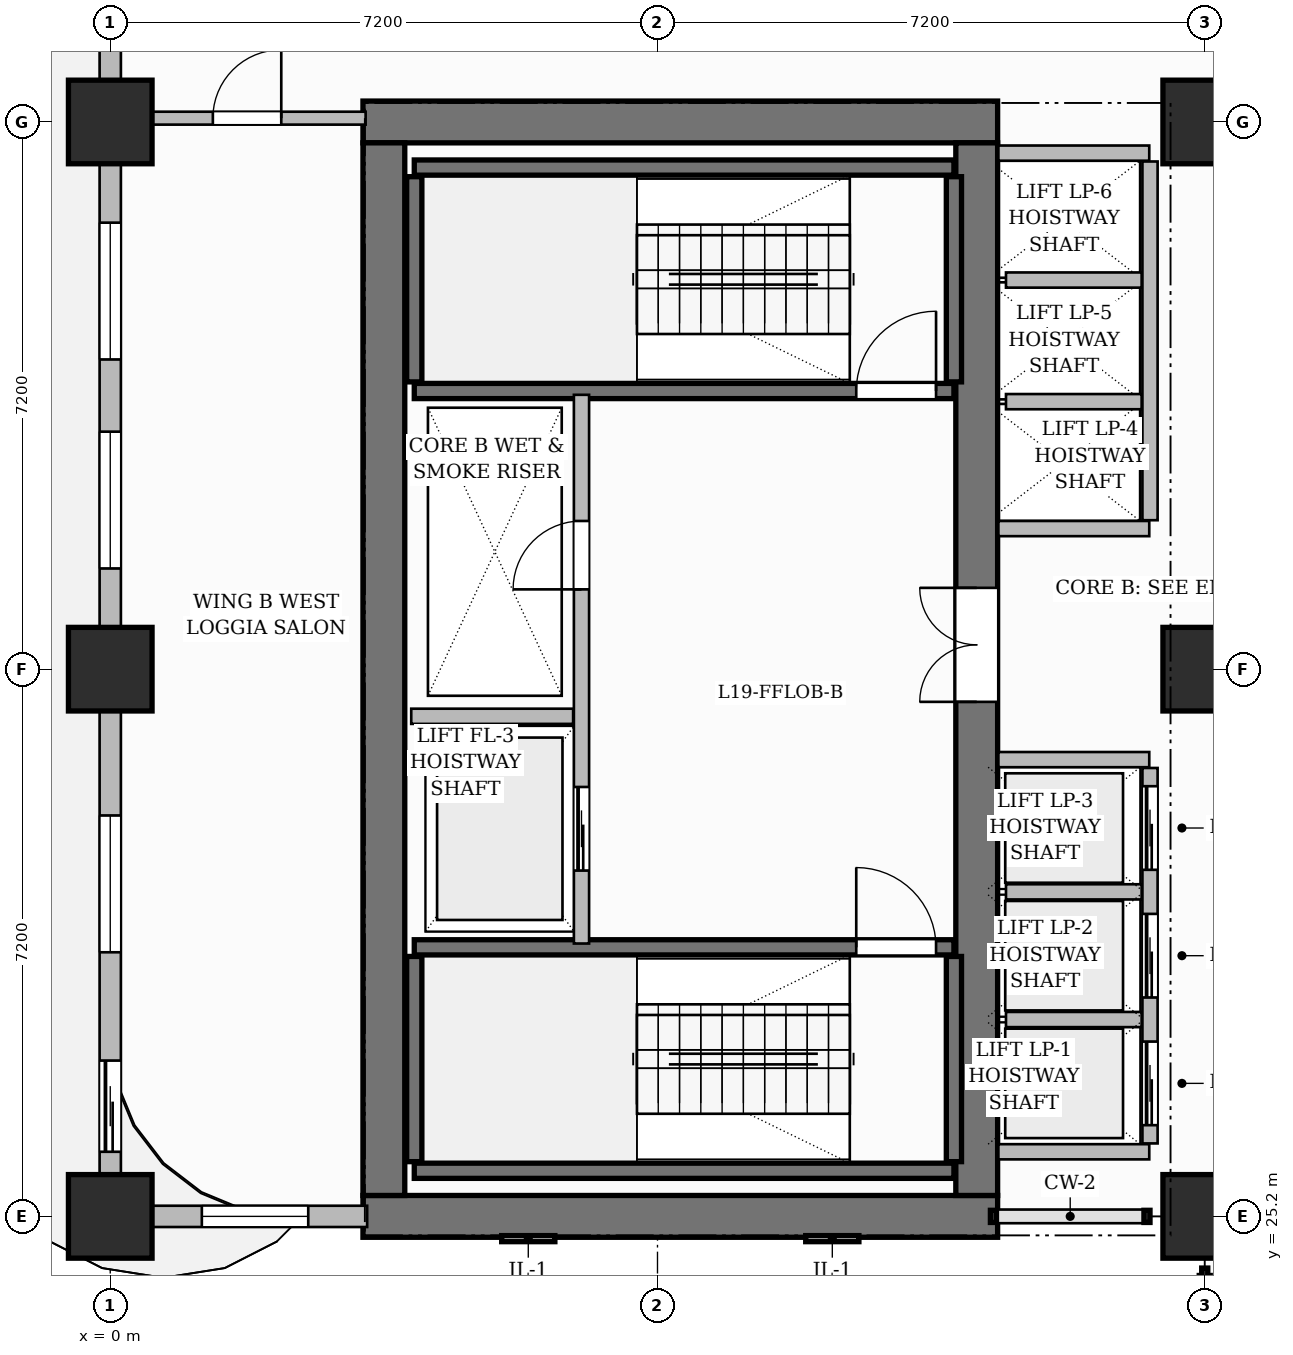
"""IFC4 building model, lengths in metres.
Left out: names, types, materials, properties, quantities, classifications, styles, units other than length and angle.
Written with IfcOpenShell. Run it as: python <this file> out.ifc"""

import sys

from ifc_helpers import new_model, si_unit, direction, frame, frame_2d, origin, origin_2d, place, context, subcontext, project, spatial, rectangle, extrude, source, transform, mapped, element, fill, save


model = new_model("IFC4")
c1 = context("Model", 3, precision=1e-05, world=origin(), true_north=direction((0.0, 1.0)))
c2 = subcontext(c1, "Body", "Model", "MODEL_VIEW")
j1 = project(units=[si_unit("LENGTHUNIT", "METRE"), si_unit("PLANEANGLEUNIT", "RADIAN")], contexts=[c1])
p1 = place(None, origin())
s1 = spatial("IfcSite", under=j1, at=p1, CompositionType="ELEMENT")
p2 = place(p1, origin())
s2 = spatial("IfcBuilding", under=s1, at=p2, CompositionType="ELEMENT")
p3 = place(p2, frame((0.0, 0.0, 80.5)))
s3 = spatial("IfcBuildingStorey", under=s2, at=p3, CompositionType="ELEMENT", Elevation=80.5)
for number, where, z_axis, x_axis in (
    (1, (3.325, 25.2, 0.0), (0.0, 0.0, 1.0), (1.0, 0.0, 0.0)),
    (2, (3.325, 39.6, 0.0), (0.0, 0.0, 1.0), (1.0, 0.0, 0.0)),
):
    element("IfcWall", number, at=place(p3, frame(where, z_axis=z_axis, x_axis=x_axis)), inside=s3, PredefinedType="SHEAR", context=c2, shape_type="SweptSolid", body=[
        extrude(rectangle(XDim=8.35, YDim=0.55, at=frame_2d((4.175, 0.0))), origin(), (0.0, 0.0, 1.0), 3.7),
    ])
p4 = place(p3, frame((3.6, 25.475, 0.0), z_axis=(0.0, 0.0, 1.0), x_axis=(0.0, 1.0, 0.0)))
e3 = element("IfcWall", 3, at=p4, inside=s3, PredefinedType="SHEAR", context=c2, shape_type="SweptSolid", body=[
    extrude(rectangle(XDim=13.85, YDim=0.55, at=frame_2d((6.925, 0.0))), origin(), (0.0, 0.0, 1.0), 3.7),
])
p5 = place(p3, frame((11.4, 25.475, 0.0), z_axis=(0.0, 0.0, 1.0), x_axis=(0.0, 1.0, 0.0)))
e4 = element("IfcWall", 4, at=p5, inside=s3, PredefinedType="SHEAR", context=c2, shape_type="SweptSolid", body=[
    extrude(rectangle(XDim=13.85, YDim=0.55, at=frame_2d((6.925, 0.0))), origin(), (0.0, 0.0, 1.0), 3.7),
])
p6 = place(p5, frame((6.495, 0.0, 0.0)))
e5 = element("IfcOpeningElement", 5, at=p6, cuts=e4, PredefinedType="OPENING", context=c2, shape_type="SweptSolid", body=[
    extrude(rectangle(XDim=1.5, YDim=2.2, at=frame_2d((0.75, 1.1))), frame((0.0, 0.285, 0.0), z_axis=(0.0, -1.0, 0.0), x_axis=(1.0, 0.0, 0.0)), (0.0, 0.0, 1.0), 0.57),
])
m1 = source(origin(), c2, "Body", "SweptSolid", [
    extrude(rectangle(XDim=1.1, YDim=1.1, at=origin_2d()), origin(), (0.0, 0.0, 1.0), 3.7),
])
for number, where, z_axis, x_axis in (
    (6, (0.0, 25.2, 0.0), (0.0, 0.0, 1.0), (1.0, 0.0, 0.0)),
    (7, (0.0, 32.4, 0.0), (0.0, 0.0, 1.0), (1.0, 0.0, 0.0)),
    (8, (0.0, 39.6, 0.0), (0.0, 0.0, 1.0), (1.0, 0.0, 0.0)),
    (9, (14.4, 25.2, 0.0), (0.0, 0.0, 1.0), (1.0, 0.0, 0.0)),
    (10, (14.4, 32.4, 0.0), (0.0, 0.0, 1.0), (1.0, 0.0, 0.0)),
    (11, (14.4, 39.6, 0.0), (0.0, 0.0, 1.0), (1.0, 0.0, 0.0)),
):
    element("IfcColumn", number, at=place(p3, frame(where, z_axis=z_axis, x_axis=x_axis)), inside=s3, PredefinedType="COLUMN", context=c2, shape_type="MappedRepresentation", body=[
        mapped(m1, transform((0.0, 0.0, 0.0), scale=1.0)),
    ])
p7 = place(p3, frame((4.0, 25.8, 0.0), z_axis=(0.0, 0.0, 1.0), x_axis=(1.0, 0.0, 0.0)))
e12 = element("IfcWall", 12, at=p7, inside=s3, PredefinedType="SHEAR", context=c2, shape_type="SweptSolid", body=[
    extrude(rectangle(XDim=7.1, YDim=0.2, at=frame_2d((3.55, 0.0))), origin(), (0.0, 0.0, 1.0), 3.7),
])
for number, where, z_axis, x_axis in (
    (13, (4.0, 25.92, 0.0), (0.0, 0.0, 1.0), (0.0, 1.0, 0.0)),
    (14, (11.1, 25.92, 0.0), (0.0, 0.0, 1.0), (0.0, 1.0, 0.0)),
):
    element("IfcWall", number, at=place(p3, frame(where, z_axis=z_axis, x_axis=x_axis)), inside=s3, PredefinedType="SHEAR", context=c2, shape_type="SweptSolid", body=[
        extrude(rectangle(XDim=2.7, YDim=0.2, at=frame_2d((1.35, 0.0))), origin(), (0.0, 0.0, 1.0), 3.7),
    ])
p8 = place(p3, frame((4.0, 28.74, 0.0), z_axis=(0.0, 0.0, 1.0), x_axis=(1.0, 0.0, 0.0)))
e15 = element("IfcWall", 15, at=p8, inside=s3, PredefinedType="SHEAR", context=c2, shape_type="SweptSolid", body=[
    extrude(rectangle(XDim=7.1, YDim=0.2, at=frame_2d((3.55, 0.0))), origin(), (0.0, 0.0, 1.0), 3.7),
])
p9 = place(p8, frame((5.815, 0.0, 0.0)))
e16 = element("IfcOpeningElement", 16, at=p9, cuts=e15, PredefinedType="OPENING", context=c2, shape_type="SweptSolid", body=[
    extrude(rectangle(XDim=1.05, YDim=2.2, at=frame_2d((0.525, 1.1))), frame((0.0, 0.11, 0.0), z_axis=(0.0, -1.0, 0.0), x_axis=(1.0, 0.0, 0.0)), (0.0, 0.0, 1.0), 0.22),
])
p10 = place(p3, frame((4.0, 39.0, 0.0), z_axis=(0.0, 0.0, 1.0), x_axis=(1.0, 0.0, 0.0)))
e17 = element("IfcWall", 17, at=p10, inside=s3, PredefinedType="SHEAR", context=c2, shape_type="SweptSolid", body=[
    extrude(rectangle(XDim=7.1, YDim=0.2, at=frame_2d((3.55, 0.0))), origin(), (0.0, 0.0, 1.0), 3.7),
])
for number, where, z_axis, x_axis in (
    (18, (4.0, 36.18, 0.0), (0.0, 0.0, 1.0), (0.0, 1.0, 0.0)),
    (19, (11.1, 36.18, 0.0), (0.0, 0.0, 1.0), (0.0, 1.0, 0.0)),
):
    element("IfcWall", number, at=place(p3, frame(where, z_axis=z_axis, x_axis=x_axis)), inside=s3, PredefinedType="SHEAR", context=c2, shape_type="SweptSolid", body=[
        extrude(rectangle(XDim=2.7, YDim=0.2, at=frame_2d((1.35, 0.0))), origin(), (0.0, 0.0, 1.0), 3.7),
    ])
p11 = place(p3, frame((4.0, 36.06, 0.0), z_axis=(0.0, 0.0, 1.0), x_axis=(1.0, 0.0, 0.0)))
e20 = element("IfcWall", 20, at=p11, inside=s3, PredefinedType="SHEAR", context=c2, shape_type="SweptSolid", body=[
    extrude(rectangle(XDim=7.1, YDim=0.2, at=frame_2d((3.55, 0.0))), origin(), (0.0, 0.0, 1.0), 3.7),
])
p12 = place(p11, frame((5.815, 0.0, 0.0)))
e21 = element("IfcOpeningElement", 21, at=p12, cuts=e20, PredefinedType="OPENING", context=c2, shape_type="SweptSolid", body=[
    extrude(rectangle(XDim=1.05, YDim=2.2, at=frame_2d((0.525, 1.1))), frame((0.0, 0.11, 0.0), z_axis=(0.0, -1.0, 0.0), x_axis=(1.0, 0.0, 0.0)), (0.0, 0.0, 1.0), 0.22),
])
p13 = place(p3, frame((6.2, 28.79, 0.0), z_axis=(0.0, 0.0, 1.0), x_axis=(0.0, 1.0, 0.0)))
e22 = element("IfcWall", 22, at=p13, inside=s3, PredefinedType="PARTITIONING", context=c2, shape_type="SweptSolid", body=[
    extrude(rectangle(XDim=7.22, YDim=0.2, at=frame_2d((3.61, 0.0))), origin(), (0.0, 0.0, 1.0), 3.45),
])
p14 = place(p13, frame((4.66, 0.0, 0.0)))
e23 = element("IfcOpeningElement", 23, at=p14, cuts=e22, PredefinedType="OPENING", context=c2, shape_type="SweptSolid", body=[
    extrude(rectangle(XDim=0.9, YDim=2.1, at=frame_2d((0.45, 1.05))), frame((0.0, 0.11, 0.0), z_axis=(0.0, -1.0, 0.0), x_axis=(1.0, 0.0, 0.0)), (0.0, 0.0, 1.0), 0.22),
])
p15 = place(p13, frame((0.96, 0.0, 0.0)))
e24 = element("IfcOpeningElement", 24, at=p15, cuts=e22, PredefinedType="OPENING", context=c2, shape_type="SweptSolid", body=[
    extrude(rectangle(XDim=1.1, YDim=2.2, at=frame_2d((0.55, 1.1))), frame((0.0, 0.11, 0.0), z_axis=(0.0, -1.0, 0.0), x_axis=(1.0, 0.0, 0.0)), (0.0, 0.0, 1.0), 0.22),
])
p16 = place(p3, frame((3.96, 31.78, 0.0), z_axis=(0.0, 0.0, 1.0), x_axis=(1.0, 0.0, 0.0)))
e25 = element("IfcWall", 25, at=p16, inside=s3, PredefinedType="PARTITIONING", context=c2, shape_type="SweptSolid", body=[
    extrude(rectangle(XDim=2.13, YDim=0.2, at=frame_2d((1.065, 0.0))), origin(), (0.0, 0.0, 1.0), 3.45),
])
for number, where, z_axis, x_axis in (
    (26, (11.685, 26.05, 0.0), (0.0, 0.0, 1.0), (1.0, 0.0, 0.0)),
    (27, (11.685, 31.21, 0.0), (0.0, 0.0, 1.0), (1.0, 0.0, 0.0)),
):
    element("IfcWall", number, at=place(p3, frame(where, z_axis=z_axis, x_axis=x_axis)), inside=s3, PredefinedType="PARTITIONING", context=c2, shape_type="SweptSolid", body=[
        extrude(rectangle(XDim=1.985, YDim=0.2, at=frame_2d((0.992, 0.0))), origin(), (0.0, 0.0, 1.0), 3.45),
    ])
p17 = place(p3, frame((13.68, 26.16, 0.0), z_axis=(0.0, 0.0, 1.0), x_axis=(0.0, 1.0, 0.0)))
e28 = element("IfcWall", 28, at=p17, inside=s3, PredefinedType="PARTITIONING", context=c2, shape_type="SweptSolid", body=[
    extrude(rectangle(XDim=4.94, YDim=0.2, at=frame_2d((2.47, 0.0))), origin(), (0.0, 0.0, 1.0), 3.45),
])
p18 = place(p17, frame((0.24, 0.0, 0.0)))
e29 = element("IfcOpeningElement", 29, at=p18, cuts=e28, PredefinedType="OPENING", context=c2, shape_type="SweptSolid", body=[
    extrude(rectangle(XDim=1.1, YDim=2.2, at=frame_2d((0.55, 1.1))), frame((0.0, 0.11, 0.0), z_axis=(0.0, -1.0, 0.0), x_axis=(1.0, 0.0, 0.0)), (0.0, 0.0, 1.0), 0.22),
])
p19 = place(p17, frame((1.92, 0.0, 0.0)))
e30 = element("IfcOpeningElement", 30, at=p19, cuts=e28, PredefinedType="OPENING", context=c2, shape_type="SweptSolid", body=[
    extrude(rectangle(XDim=1.1, YDim=2.2, at=frame_2d((0.55, 1.1))), frame((0.0, 0.11, 0.0), z_axis=(0.0, -1.0, 0.0), x_axis=(1.0, 0.0, 0.0)), (0.0, 0.0, 1.0), 0.22),
])
p20 = place(p17, frame((3.6, 0.0, 0.0)))
e31 = element("IfcOpeningElement", 31, at=p20, cuts=e28, PredefinedType="OPENING", context=c2, shape_type="SweptSolid", body=[
    extrude(rectangle(XDim=1.1, YDim=2.2, at=frame_2d((0.55, 1.1))), frame((0.0, 0.11, 0.0), z_axis=(0.0, -1.0, 0.0), x_axis=(1.0, 0.0, 0.0)), (0.0, 0.0, 1.0), 0.22),
])
for number, where, z_axis, x_axis in (
    (32, (11.785, 27.79, 0.0), (0.0, 0.0, 1.0), (1.0, 0.0, 0.0)),
    (33, (11.785, 29.47, 0.0), (0.0, 0.0, 1.0), (1.0, 0.0, 0.0)),
):
    element("IfcWall", number, at=place(p3, frame(where, z_axis=z_axis, x_axis=x_axis)), inside=s3, PredefinedType="PARTITIONING", context=c2, shape_type="SweptSolid", body=[
        extrude(rectangle(XDim=1.785, YDim=0.2, at=frame_2d((0.893, 0.0))), origin(), (0.0, 0.0, 1.0), 3.45),
    ])
for number, where, z_axis, x_axis in (
    (34, (11.685, 34.25, 0.0), (0.0, 0.0, 1.0), (1.0, 0.0, 0.0)),
    (35, (11.685, 39.19, 0.0), (0.0, 0.0, 1.0), (1.0, 0.0, 0.0)),
):
    element("IfcWall", number, at=place(p3, frame(where, z_axis=z_axis, x_axis=x_axis)), inside=s3, PredefinedType="PARTITIONING", context=c2, shape_type="SweptSolid", body=[
        extrude(rectangle(XDim=1.985, YDim=0.2, at=frame_2d((0.992, 0.0))), origin(), (0.0, 0.0, 1.0), 3.45),
    ])
p21 = place(p3, frame((13.68, 34.36, 0.0), z_axis=(0.0, 0.0, 1.0), x_axis=(0.0, 1.0, 0.0)))
e36 = element("IfcWall", 36, at=p21, inside=s3, PredefinedType="PARTITIONING", context=c2, shape_type="SweptSolid", body=[
    extrude(rectangle(XDim=4.72, YDim=0.2, at=frame_2d((2.36, 0.0))), origin(), (0.0, 0.0, 1.0), 3.45),
])
for number, where, z_axis, x_axis in (
    (37, (11.785, 35.92, 0.0), (0.0, 0.0, 1.0), (1.0, 0.0, 0.0)),
    (38, (11.785, 37.52, 0.0), (0.0, 0.0, 1.0), (1.0, 0.0, 0.0)),
):
    element("IfcWall", number, at=place(p3, frame(where, z_axis=z_axis, x_axis=x_axis)), inside=s3, PredefinedType="PARTITIONING", context=c2, shape_type="SweptSolid", body=[
        extrude(rectangle(XDim=1.785, YDim=0.2, at=frame_2d((0.893, 0.0))), origin(), (0.0, 0.0, 1.0), 3.45),
    ])
p22 = place(p3, frame((0.24, 39.65, 0.0), z_axis=(0.0, 0.0, 1.0), x_axis=(1.0, 0.0, 0.0)))
e39 = element("IfcWall", 39, at=p22, inside=s3, PredefinedType="PARTITIONING", context=c2, shape_type="SweptSolid", body=[
    extrude(rectangle(XDim=3.12, YDim=0.17, at=frame_2d((1.56, 0.0))), origin(), (0.0, 0.0, 1.0), 3.45),
])
p23 = place(p22, frame((1.11, 0.0, 0.0)))
e40 = element("IfcOpeningElement", 40, at=p23, cuts=e39, PredefinedType="OPENING", context=c2, shape_type="SweptSolid", body=[
    extrude(rectangle(XDim=0.9, YDim=2.15, at=frame_2d((0.45, 1.075))), frame((0.0, 0.095, 0.0), z_axis=(0.0, -1.0, 0.0), x_axis=(1.0, 0.0, 0.0)), (0.0, 0.0, 1.0), 0.19),
])
p24 = place(p3, frame((0.0, 25.2, 0.0), z_axis=(0.0, 0.0, 1.0), x_axis=(1.0, 0.0, 0.0)))
e41 = element("IfcWall", 41, at=p24, inside=s3, PredefinedType="SOLIDWALL", context=c2, shape_type="SweptSolid", body=[
    extrude(rectangle(XDim=3.38, YDim=0.28, at=frame_2d((1.69, 0.0))), origin(), (0.0, 0.0, 1.0), 3.45),
])
p25 = place(p24, frame((1.205, 0.0, 0.8)))
e42 = element("IfcOpeningElement", 42, at=p25, cuts=e41, PredefinedType="OPENING", context=c2, shape_type="SweptSolid", body=[
    extrude(rectangle(XDim=1.4, YDim=1.85, at=frame_2d((0.7, 0.925))), frame((0.0, 0.15, 0.0), z_axis=(0.0, -1.0, 0.0), x_axis=(1.0, 0.0, 0.0)), (0.0, 0.0, 1.0), 0.3),
])
p26 = place(p3, frame((0.0, 25.25, 0.0), z_axis=(0.0, 0.0, 1.0), x_axis=(0.0, 1.0, 0.0)))
e43 = element("IfcWall", 43, at=p26, inside=s3, PredefinedType="SOLIDWALL", context=c2, shape_type="SweptSolid", body=[
    extrude(rectangle(XDim=21.5, YDim=0.28, at=frame_2d((10.75, 0.0))), origin(), (0.0, 0.0, 1.0), 2.885),
])
p27 = place(p26, frame((18.357, 0.0, 0.0)))
e44 = element("IfcOpeningElement", 44, at=p27, cuts=e43, PredefinedType="OPENING", context=c2, shape_type="SweptSolid", body=[
    extrude(rectangle(XDim=1.2, YDim=2.2, at=frame_2d((0.6, 1.1))), frame((0.0, 0.15, 0.0), z_axis=(0.0, -1.0, 0.0), x_axis=(1.0, 0.0, 0.0)), (0.0, 0.0, 1.0), 0.3),
])
p28 = place(p26, frame((0.8, 0.0, 0.0)))
e45 = element("IfcOpeningElement", 45, at=p28, cuts=e43, PredefinedType="OPENING", context=c2, shape_type="SweptSolid", body=[
    extrude(rectangle(XDim=1.2, YDim=2.2, at=frame_2d((0.6, 1.1))), frame((0.0, 0.15, 0.0), z_axis=(0.0, -1.0, 0.0), x_axis=(1.0, 0.0, 0.0)), (0.0, 0.0, 1.0), 0.3),
])
p29 = place(p26, frame((3.425, 0.0, 0.8)))
e46 = element("IfcOpeningElement", 46, at=p29, cuts=e43, PredefinedType="OPENING", context=c2, shape_type="SweptSolid", body=[
    extrude(rectangle(XDim=1.8, YDim=1.85, at=frame_2d((0.9, 0.925))), frame((0.0, 0.15, 0.0), z_axis=(0.0, -1.0, 0.0), x_axis=(1.0, 0.0, 0.0)), (0.0, 0.0, 1.0), 0.3),
])
p30 = place(p26, frame((8.475, 0.0, 0.8)))
e47 = element("IfcOpeningElement", 47, at=p30, cuts=e43, PredefinedType="OPENING", context=c2, shape_type="SweptSolid", body=[
    extrude(rectangle(XDim=1.8, YDim=1.85, at=frame_2d((0.9, 0.925))), frame((0.0, 0.15, 0.0), z_axis=(0.0, -1.0, 0.0), x_axis=(1.0, 0.0, 0.0)), (0.0, 0.0, 1.0), 0.3),
])
p31 = place(p26, frame((11.225, 0.0, 0.8)))
e48 = element("IfcOpeningElement", 48, at=p31, cuts=e43, PredefinedType="OPENING", context=c2, shape_type="SweptSolid", body=[
    extrude(rectangle(XDim=1.8, YDim=1.85, at=frame_2d((0.9, 0.925))), frame((0.0, 0.15, 0.0), z_axis=(0.0, -1.0, 0.0), x_axis=(1.0, 0.0, 0.0)), (0.0, 0.0, 1.0), 0.3),
])
p32 = place(p26, frame((16.632, 0.0, 0.8)))
e49 = element("IfcOpeningElement", 49, at=p32, cuts=e43, PredefinedType="OPENING", context=c2, shape_type="SweptSolid", body=[
    extrude(rectangle(XDim=1.15, YDim=1.8, at=frame_2d((0.575, 0.9))), frame((0.0, 0.15, 0.0), z_axis=(0.0, -1.0, 0.0), x_axis=(1.0, 0.0, 0.0)), (0.0, 0.0, 1.0), 0.3),
])
m2 = source(origin(), c2, "Body", "SweptSolid", [
    extrude(rectangle(XDim=1.05, YDim=2.2, at=frame_2d((0.525, 1.1))), frame((0.0, 0.025, 0.0), z_axis=(0.0, -1.0, 0.0), x_axis=(1.0, 0.0, 0.0)), (0.0, 0.0, 1.0), 0.05),
])
p33 = place(p9, origin())
e50 = element("IfcDoor", 50, at=p33, inside=s3, OperationType="SINGLE_SWING_LEFT", PredefinedType="DOOR", context=c2, shape_type="MappedRepresentation", body=[
    mapped(m2, transform((0.0, 0.0, 0.0), scale=1.0)),
])
fill(e16, e50)
p34 = place(p12, origin())
e51 = element("IfcDoor", 51, at=p34, inside=s3, OperationType="SINGLE_SWING_RIGHT", PredefinedType="DOOR", context=c2, shape_type="MappedRepresentation", body=[
    mapped(m2, transform((0.0, 0.0, 0.0), scale=1.0)),
])
fill(e21, e51)
m3 = source(origin(), c2, "Body", "SweptSolid", [
    extrude(rectangle(XDim=0.9, YDim=2.1, at=frame_2d((0.45, 1.05))), frame((0.0, 0.025, 0.0), z_axis=(0.0, -1.0, 0.0), x_axis=(1.0, 0.0, 0.0)), (0.0, 0.0, 1.0), 0.05),
])
p35 = place(p14, origin())
e52 = element("IfcDoor", 52, at=p35, inside=s3, OperationType="SINGLE_SWING_LEFT", PredefinedType="DOOR", context=c2, shape_type="MappedRepresentation", body=[
    mapped(m3, transform((0.0, 0.0, 0.0), scale=1.0)),
])
fill(e23, e52)
m4 = source(origin(), c2, "Body", "SweptSolid", [
    extrude(rectangle(XDim=1.5, YDim=2.2, at=frame_2d((0.75, 1.1))), frame((0.0, 0.025, 0.0), z_axis=(0.0, -1.0, 0.0), x_axis=(1.0, 0.0, 0.0)), (0.0, 0.0, 1.0), 0.05),
])
p36 = place(p6, origin())
e53 = element("IfcDoor", 53, at=p36, inside=s3, OperationType="DOUBLE_DOOR_SINGLE_SWING", PredefinedType="DOOR", context=c2, shape_type="MappedRepresentation", body=[
    mapped(m4, transform((0.0, 0.0, 0.0), scale=1.0)),
])
fill(e5, e53)
m5 = source(origin(), c2, "Body", "SweptSolid", [
    extrude(rectangle(XDim=0.9, YDim=2.15, at=frame_2d((0.45, 1.075))), frame((0.0, 0.025, 0.0), z_axis=(0.0, -1.0, 0.0), x_axis=(1.0, 0.0, 0.0)), (0.0, 0.0, 1.0), 0.05),
])
p37 = place(p23, origin())
e54 = element("IfcDoor", 54, at=p37, inside=s3, OperationType="SINGLE_SWING_RIGHT", PredefinedType="DOOR", context=c2, shape_type="MappedRepresentation", body=[
    mapped(m5, transform((0.0, 0.0, 0.0), scale=1.0)),
])
fill(e40, e54)
m6 = source(origin(), c2, "Body", "SweptSolid", [
    extrude(rectangle(XDim=1.1, YDim=2.2, at=frame_2d((0.55, 1.1))), frame((0.0, 0.025, 0.0), z_axis=(0.0, -1.0, 0.0), x_axis=(1.0, 0.0, 0.0)), (0.0, 0.0, 1.0), 0.05),
])
p38 = place(p15, origin())
e55 = element("IfcDoor", 55, at=p38, inside=s3, OperationType="SLIDING_TO_LEFT", PredefinedType="DOOR", context=c2, shape_type="MappedRepresentation", body=[
    mapped(m6, transform((0.0, 0.0, 0.0), scale=1.0)),
])
fill(e24, e55)
p39 = place(p18, origin())
e56 = element("IfcDoor", 56, at=p39, inside=s3, OperationType="SLIDING_TO_LEFT", PredefinedType="DOOR", context=c2, shape_type="MappedRepresentation", body=[
    mapped(m6, transform((0.0, 0.0, 0.0), scale=1.0)),
])
fill(e29, e56)
p40 = place(p19, origin())
e57 = element("IfcDoor", 57, at=p40, inside=s3, OperationType="SLIDING_TO_LEFT", PredefinedType="DOOR", context=c2, shape_type="MappedRepresentation", body=[
    mapped(m6, transform((0.0, 0.0, 0.0), scale=1.0)),
])
fill(e30, e57)
p41 = place(p20, origin())
e58 = element("IfcDoor", 58, at=p41, inside=s3, OperationType="SLIDING_TO_LEFT", PredefinedType="DOOR", context=c2, shape_type="MappedRepresentation", body=[
    mapped(m6, transform((0.0, 0.0, 0.0), scale=1.0)),
])
fill(e31, e58)
m7 = source(origin(), c2, "Body", "SweptSolid", [
    extrude(rectangle(XDim=1.2, YDim=2.2, at=frame_2d((0.6, 1.1))), frame((0.0, 0.025, 0.0), z_axis=(0.0, -1.0, 0.0), x_axis=(1.0, 0.0, 0.0)), (0.0, 0.0, 1.0), 0.05),
])
p42 = place(p28, origin())
e59 = element("IfcDoor", 59, at=p42, inside=s3, OperationType="SLIDING_TO_LEFT", PredefinedType="DOOR", context=c2, shape_type="MappedRepresentation", body=[
    mapped(m7, transform((0.0, 0.0, 0.0), scale=1.0)),
])
fill(e45, e59)
m8 = source(origin(), c2, "Body", "SweptSolid", [
    extrude(rectangle(XDim=1.4, YDim=1.85, at=frame_2d((0.7, 0.925))), frame((0.0, 0.03, 0.0), z_axis=(0.0, -1.0, 0.0), x_axis=(1.0, 0.0, 0.0)), (0.0, 0.0, 1.0), 0.06),
])
p43 = place(p25, origin())
e60 = element("IfcWindow", 60, at=p43, inside=s3, PartitioningType="SINGLE_PANEL", PredefinedType="WINDOW", context=c2, shape_type="MappedRepresentation", body=[
    mapped(m8, transform((0.0, 0.0, 0.0), scale=1.0)),
])
fill(e42, e60)
m9 = source(origin(), c2, "Body", "SweptSolid", [
    extrude(rectangle(XDim=1.8, YDim=1.85, at=frame_2d((0.9, 0.925))), frame((0.0, 0.03, 0.0), z_axis=(0.0, -1.0, 0.0), x_axis=(1.0, 0.0, 0.0)), (0.0, 0.0, 1.0), 0.06),
])
p44 = place(p29, origin())
e61 = element("IfcWindow", 61, at=p44, inside=s3, PartitioningType="DOUBLE_PANEL_VERTICAL", PredefinedType="WINDOW", context=c2, shape_type="MappedRepresentation", body=[
    mapped(m9, transform((0.0, 0.0, 0.0), scale=1.0)),
])
fill(e46, e61)
p45 = place(p30, origin())
e62 = element("IfcWindow", 62, at=p45, inside=s3, PartitioningType="DOUBLE_PANEL_VERTICAL", PredefinedType="WINDOW", context=c2, shape_type="MappedRepresentation", body=[
    mapped(m9, transform((0.0, 0.0, 0.0), scale=1.0)),
])
fill(e47, e62)
p46 = place(p31, origin())
e63 = element("IfcWindow", 63, at=p46, inside=s3, PartitioningType="DOUBLE_PANEL_VERTICAL", PredefinedType="WINDOW", context=c2, shape_type="MappedRepresentation", body=[
    mapped(m9, transform((0.0, 0.0, 0.0), scale=1.0)),
])
fill(e48, e63)
save(model, sys.argv[1])
